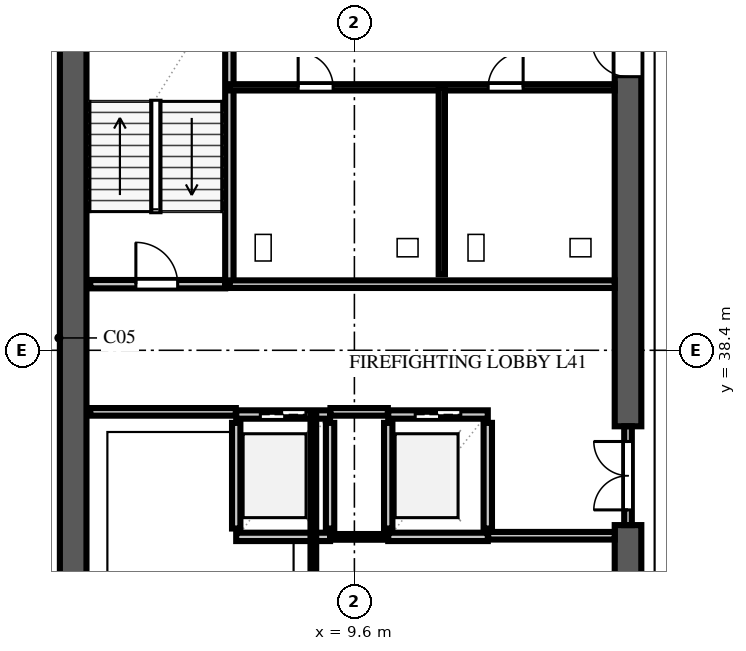
"""IFC4 building model, lengths in metres.
Left out: names, types, materials, properties, quantities, classifications, styles, units other than length and angle.
Written with IfcOpenShell. Run it as: python <this file> out.ifc"""

import sys

from ifc_helpers import new_model, si_unit, direction, frame, frame_2d, origin, place, context, subcontext, project, spatial, rectangle, extrude, element, fill, save


model = new_model("IFC4")
c1 = context("Model", 3, precision=1e-05, world=origin(), true_north=direction((0.0, 1.0)))
c2 = subcontext(c1, "Body", "Model", "MODEL_VIEW")
j1 = project(units=[si_unit("LENGTHUNIT", "METRE"), si_unit("PLANEANGLEUNIT", "RADIAN")], contexts=[c1])
p1 = place(None, origin())
s1 = spatial("IfcSite", under=j1, at=p1, CompositionType="ELEMENT")
p2 = place(p1, origin())
s2 = spatial("IfcBuilding", under=s1, at=p2, CompositionType="ELEMENT")
p3 = place(p2, frame((0.0, 0.0, 163.6)))
s3 = spatial("IfcBuildingStorey", under=s2, at=p3, CompositionType="ELEMENT", Elevation=163.6)
p4 = place(p3, frame((2.2, 9.25, 0.0), z_axis=(0.0, 0.0, 1.0), x_axis=(0.0, 1.0, 0.0)))
e1 = element("IfcWall", 1, at=p4, inside=s3, PredefinedType="SHEAR", context=c2, shape_type="SweptSolid", body=[
    extrude(rectangle(XDim=39.1, YDim=0.7, at=frame_2d((19.55, 0.0))), origin(), (0.0, 0.0, 1.0), 3.54),
])
p5 = place(p3, frame((16.8, 26.0, 0.0), z_axis=(0.0, 0.0, 1.0), x_axis=(0.0, 1.0, 0.0)))
e2 = element("IfcWall", 2, at=p5, inside=s3, PredefinedType="SHEAR", context=c2, shape_type="SweptSolid", body=[
    extrude(rectangle(XDim=7.8, YDim=0.7, at=frame_2d((3.9, 0.0))), origin(), (0.0, 0.0, 1.0), 3.54),
])
p6 = place(p3, frame((16.8, 36.4, 0.0), z_axis=(0.0, 0.0, 1.0), x_axis=(0.0, 1.0, 0.0)))
e3 = element("IfcWall", 3, at=p6, inside=s3, PredefinedType="SHEAR", context=c2, shape_type="SweptSolid", body=[
    extrude(rectangle(XDim=11.25, YDim=0.7, at=frame_2d((5.625, 0.0))), origin(), (0.0, 0.0, 1.0), 3.54),
])
p7 = place(p6, frame((9.2, 0.0, 0.0)))
e4 = element("IfcOpeningElement", 4, at=p7, cuts=e3, PredefinedType="OPENING", context=c2, shape_type="SweptSolid", body=[
    extrude(rectangle(XDim=0.95, YDim=2.15, at=frame_2d((0.475, 1.075))), frame((0.0, 0.362, 0.0), z_axis=(0.0, -1.0, 0.0), x_axis=(1.0, 0.0, 0.0)), (0.0, 0.0, 1.0), 0.724),
])
p8 = place(p3, frame((2.65, 40.14, 0.0), z_axis=(0.0, 0.0, 1.0), x_axis=(1.0, 0.0, 0.0)))
e5 = element("IfcWall", 5, at=p8, inside=s3, PredefinedType="SOLIDWALL", context=c2, shape_type="SweptSolid", body=[
    extrude(rectangle(XDim=3.55, YDim=0.22, at=frame_2d((1.775, 0.0))), origin(), (0.0, 0.0, 1.0), 3.54),
])
p9 = place(p8, frame((1.2, 0.0, 0.0)))
e6 = element("IfcOpeningElement", 6, at=p9, cuts=e5, PredefinedType="OPENING", context=c2, shape_type="SweptSolid", body=[
    extrude(rectangle(XDim=1.1, YDim=2.2, at=frame_2d((0.55, 1.1))), frame((0.0, 0.122, 0.0), z_axis=(0.0, -1.0, 0.0), x_axis=(1.0, 0.0, 0.0)), (0.0, 0.0, 1.0), 0.244),
])
p10 = place(p3, frame((6.31, 40.14, 0.0), z_axis=(0.0, 0.0, 1.0), x_axis=(0.0, 1.0, 0.0)))
e7 = element("IfcWall", 7, at=p10, inside=s3, PredefinedType="SOLIDWALL", context=c2, shape_type="SweptSolid", body=[
    extrude(rectangle(XDim=7.81, YDim=0.22, at=frame_2d((3.905, 0.0))), origin(), (0.0, 0.0, 1.0), 3.54),
])
for number, where, z_axis, x_axis in (
    (8, (6.49, 33.71, 0.0), (0.0, 0.0, 1.0), (0.0, 1.0, 0.0)),
    (9, (8.96, 33.71, 0.0), (0.0, 0.0, 1.0), (0.0, 1.0, 0.0)),
):
    element("IfcWall", number, at=place(p3, frame(where, z_axis=z_axis, x_axis=x_axis)), inside=s3, PredefinedType="SOLIDWALL", context=c2, shape_type="SweptSolid", body=[
        extrude(rectangle(XDim=2.78, YDim=0.22, at=frame_2d((1.39, 0.0))), origin(), (0.0, 0.0, 1.0), 3.54),
    ])
p11 = place(p3, frame((6.49, 33.49, 0.0), z_axis=(0.0, 0.0, 1.0), x_axis=(1.0, 0.0, 0.0)))
e10 = element("IfcWall", 10, at=p11, inside=s3, PredefinedType="SOLIDWALL", context=c2, shape_type="SweptSolid", body=[
    extrude(rectangle(XDim=2.47, YDim=0.22, at=frame_2d((1.235, 0.0))), origin(), (0.0, 0.0, 1.0), 3.54),
])
p12 = place(p3, frame((6.49, 36.71, 0.0), z_axis=(0.0, 0.0, 1.0), x_axis=(1.0, 0.0, 0.0)))
e11 = element("IfcWall", 11, at=p12, inside=s3, PredefinedType="SOLIDWALL", context=c2, shape_type="SweptSolid", body=[
    extrude(rectangle(XDim=2.47, YDim=0.22, at=frame_2d((1.235, 0.0))), origin(), (0.0, 0.0, 1.0), 3.54),
])
p13 = place(p12, frame((0.635, 0.0, 0.0)))
e12 = element("IfcOpeningElement", 12, at=p13, cuts=e11, PredefinedType="OPENING", context=c2, shape_type="SweptSolid", body=[
    extrude(rectangle(XDim=1.2, YDim=2.2, at=frame_2d((0.6, 1.1))), frame((0.0, 0.122, 0.0), z_axis=(0.0, -1.0, 0.0), x_axis=(1.0, 0.0, 0.0)), (0.0, 0.0, 1.0), 0.244),
])
for number, where, z_axis, x_axis in (
    (13, (10.49, 33.71, 0.0), (0.0, 0.0, 1.0), (0.0, 1.0, 0.0)),
    (14, (13.11, 33.71, 0.0), (0.0, 0.0, 1.0), (0.0, 1.0, 0.0)),
):
    element("IfcWall", number, at=place(p3, frame(where, z_axis=z_axis, x_axis=x_axis)), inside=s3, PredefinedType="SOLIDWALL", context=c2, shape_type="SweptSolid", body=[
        extrude(rectangle(XDim=2.78, YDim=0.22, at=frame_2d((1.39, 0.0))), origin(), (0.0, 0.0, 1.0), 3.54),
    ])
p14 = place(p3, frame((10.49, 33.49, 0.0), z_axis=(0.0, 0.0, 1.0), x_axis=(1.0, 0.0, 0.0)))
e15 = element("IfcWall", 15, at=p14, inside=s3, PredefinedType="SOLIDWALL", context=c2, shape_type="SweptSolid", body=[
    extrude(rectangle(XDim=2.62, YDim=0.22, at=frame_2d((1.31, 0.0))), origin(), (0.0, 0.0, 1.0), 3.54),
])
p15 = place(p3, frame((10.49, 36.71, 0.0), z_axis=(0.0, 0.0, 1.0), x_axis=(1.0, 0.0, 0.0)))
e16 = element("IfcWall", 16, at=p15, inside=s3, PredefinedType="SOLIDWALL", context=c2, shape_type="SweptSolid", body=[
    extrude(rectangle(XDim=2.62, YDim=0.22, at=frame_2d((1.31, 0.0))), origin(), (0.0, 0.0, 1.0), 3.54),
])
p16 = place(p15, frame((0.71, 0.0, 0.0)))
e17 = element("IfcOpeningElement", 17, at=p16, cuts=e16, PredefinedType="OPENING", context=c2, shape_type="SweptSolid", body=[
    extrude(rectangle(XDim=1.2, YDim=2.2, at=frame_2d((0.6, 1.1))), frame((0.0, 0.122, 0.0), z_axis=(0.0, -1.0, 0.0), x_axis=(1.0, 0.0, 0.0)), (0.0, 0.0, 1.0), 0.244),
])
p17 = place(p3, frame((2.65, 36.78, 0.0), z_axis=(0.0, 0.0, 1.0), x_axis=(1.0, 0.0, 0.0)))
e18 = element("IfcWall", 18, at=p17, inside=s3, PredefinedType="SOLIDWALL", context=c2, shape_type="SweptSolid", body=[
    extrude(rectangle(XDim=3.83, YDim=0.2, at=frame_2d((1.915, 0.0))), origin(), (0.0, 0.0, 1.0), 3.54),
])
p18 = place(p3, frame((8.97, 36.78, 0.0), z_axis=(0.0, 0.0, 1.0), x_axis=(1.0, 0.0, 0.0)))
e19 = element("IfcWall", 19, at=p18, inside=s3, PredefinedType="SOLIDWALL", context=c2, shape_type="SweptSolid", body=[
    extrude(rectangle(XDim=1.51, YDim=0.2, at=frame_2d((0.755, 0.0))), origin(), (0.0, 0.0, 1.0), 3.54),
])
p19 = place(p3, frame((13.12, 33.52, 0.0), z_axis=(0.0, 0.0, 1.0), x_axis=(1.0, 0.0, 0.0)))
e20 = element("IfcWall", 20, at=p19, inside=s3, PredefinedType="SOLIDWALL", context=c2, shape_type="SweptSolid", body=[
    extrude(rectangle(XDim=3.33, YDim=0.2, at=frame_2d((1.665, 0.0))), origin(), (0.0, 0.0, 1.0), 3.54),
])
p20 = place(p3, frame((6.32, 40.14, 0.0), z_axis=(0.0, 0.0, 1.0), x_axis=(1.0, 0.0, 0.0)))
e21 = element("IfcWall", 21, at=p20, inside=s3, PredefinedType="SOLIDWALL", context=c2, shape_type="SweptSolid", body=[
    extrude(rectangle(XDim=10.13, YDim=0.2, at=frame_2d((5.065, 0.0))), origin(), (0.0, 0.0, 1.0), 3.54),
])
p21 = place(p3, frame((16.8, 33.8, 0.0), z_axis=(0.0, 0.0, 1.0), x_axis=(0.0, 1.0, 0.0)))
e22 = element("IfcWall", 22, at=p21, inside=s3, PredefinedType="SOLIDWALL", context=c2, shape_type="SweptSolid", body=[
    extrude(rectangle(XDim=2.6, YDim=0.2, at=frame_2d((1.3, 0.0))), origin(), (0.0, 0.0, 1.0), 3.54),
])
p22 = place(p21, frame((0.4, 0.0, 0.0)))
e23 = element("IfcOpeningElement", 23, at=p22, cuts=e22, PredefinedType="OPENING", context=c2, shape_type="SweptSolid", body=[
    extrude(rectangle(XDim=1.8, YDim=2.2, at=frame_2d((0.9, 1.1))), frame((0.0, 0.112, 0.0), z_axis=(0.0, -1.0, 0.0), x_axis=(1.0, 0.0, 0.0)), (0.0, 0.0, 1.0), 0.224),
])
p23 = place(p3, frame((8.965, 33.49, 0.0), z_axis=(0.0, 0.0, 1.0), x_axis=(1.0, 0.0, 0.0)))
e24 = element("IfcWall", 24, at=p23, inside=s3, PredefinedType="PARTITIONING", context=c2, shape_type="SweptSolid", body=[
    extrude(rectangle(XDim=1.52, YDim=0.15, at=frame_2d((0.76, 0.0))), origin(), (0.0, 0.0, 1.0), 3.54),
])
p24 = place(p3, frame((8.52, 12.02, 0.0), z_axis=(0.0, 0.0, 1.0), x_axis=(0.0, 1.0, 0.0)))
e25 = element("IfcWall", 25, at=p24, inside=s3, PredefinedType="PARTITIONING", context=c2, shape_type="SweptSolid", body=[
    extrude(rectangle(XDim=24.76, YDim=0.15, at=frame_2d((12.38, 0.0))), origin(), (0.0, 0.0, 1.0), 3.54),
])
p25 = place(p24, frame((2.0, 0.0, 0.0)))
e26 = element("IfcOpeningElement", 26, at=p25, cuts=e25, PredefinedType="OPENING", context=c2, shape_type="SweptSolid", body=[
    extrude(rectangle(XDim=0.85, YDim=2.1, at=frame_2d((0.425, 1.05))), frame((0.0, 0.087, 0.0), z_axis=(0.0, -1.0, 0.0), x_axis=(1.0, 0.0, 0.0)), (0.0, 0.0, 1.0), 0.174),
])
p26 = place(p24, frame((12.0, 0.0, 0.0)))
e27 = element("IfcOpeningElement", 27, at=p26, cuts=e25, PredefinedType="OPENING", context=c2, shape_type="SweptSolid", body=[
    extrude(rectangle(XDim=1.0, YDim=2.2, at=frame_2d((0.5, 1.1))), frame((0.0, 0.087, 0.0), z_axis=(0.0, -1.0, 0.0), x_axis=(1.0, 0.0, 0.0)), (0.0, 0.0, 1.0), 0.174),
])
p27 = place(p3, frame((6.32, 45.32, 0.0), z_axis=(0.0, 0.0, 1.0), x_axis=(1.0, 0.0, 0.0)))
e28 = element("IfcWall", 28, at=p27, inside=s3, PredefinedType="PLUMBINGWALL", context=c2, shape_type="SweptSolid", body=[
    extrude(rectangle(XDim=10.13, YDim=0.165, at=frame_2d((5.065, 0.0))), origin(), (0.0, 0.0, 1.0), 3.54),
])
p28 = place(p27, frame((1.8, 0.0, 0.0)))
e29 = element("IfcOpeningElement", 29, at=p28, cuts=e28, PredefinedType="OPENING", context=c2, shape_type="SweptSolid", body=[
    extrude(rectangle(XDim=0.92, YDim=2.15, at=frame_2d((0.46, 1.075))), frame((0.0, 0.094, 0.0), z_axis=(0.0, -1.0, 0.0), x_axis=(1.0, 0.0, 0.0)), (0.0, 0.0, 1.0), 0.189),
])
p29 = place(p27, frame((6.8, 0.0, 0.0)))
e30 = element("IfcOpeningElement", 30, at=p29, cuts=e28, PredefinedType="OPENING", context=c2, shape_type="SweptSolid", body=[
    extrude(rectangle(XDim=0.92, YDim=2.15, at=frame_2d((0.46, 1.075))), frame((0.0, 0.094, 0.0), z_axis=(0.0, -1.0, 0.0), x_axis=(1.0, 0.0, 0.0)), (0.0, 0.0, 1.0), 0.189),
])
p30 = place(p3, frame((11.9, 40.4, 0.0), z_axis=(0.0, 0.0, 1.0), x_axis=(0.0, 1.0, 0.0)))
e31 = element("IfcWall", 31, at=p30, inside=s3, PredefinedType="PLUMBINGWALL", context=c2, shape_type="SweptSolid", body=[
    extrude(rectangle(XDim=4.92, YDim=0.165, at=frame_2d((2.46, 0.0))), origin(), (0.0, 0.0, 1.0), 3.54),
])
p31 = place(p9, origin())
e32 = element("IfcDoor", 32, at=p31, inside=s3, OperationType="SINGLE_SWING_LEFT", PredefinedType="DOOR", context=c2, shape_type="SweptSolid", body=[
    extrude(rectangle(XDim=1.1, YDim=2.2, at=frame_2d((0.55, 1.1))), frame((0.0, 0.025, 0.0), z_axis=(0.0, -1.0, 0.0), x_axis=(1.0, 0.0, 0.0)), (0.0, 0.0, 1.0), 0.05),
])
fill(e6, e32)
p32 = place(p13, origin())
e33 = element("IfcDoor", 33, at=p32, inside=s3, OperationType="DOUBLE_DOOR_SLIDING", PredefinedType="DOOR", context=c2, shape_type="SweptSolid", body=[
    extrude(rectangle(XDim=1.2, YDim=2.2, at=frame_2d((0.6, 1.1))), frame((0.0, 0.025, 0.0), z_axis=(0.0, -1.0, 0.0), x_axis=(1.0, 0.0, 0.0)), (0.0, 0.0, 1.0), 0.05),
])
fill(e12, e33)
p33 = place(p16, origin())
e34 = element("IfcDoor", 34, at=p33, inside=s3, OperationType="DOUBLE_DOOR_SLIDING", PredefinedType="DOOR", context=c2, shape_type="SweptSolid", body=[
    extrude(rectangle(XDim=1.2, YDim=2.2, at=frame_2d((0.6, 1.1))), frame((0.0, 0.025, 0.0), z_axis=(0.0, -1.0, 0.0), x_axis=(1.0, 0.0, 0.0)), (0.0, 0.0, 1.0), 0.05),
])
fill(e17, e34)
p34 = place(p7, origin())
e35 = element("IfcDoor", 35, at=p34, inside=s3, OperationType="SINGLE_SWING_RIGHT", PredefinedType="DOOR", context=c2, shape_type="SweptSolid", body=[
    extrude(rectangle(XDim=0.95, YDim=2.15, at=frame_2d((0.475, 1.075))), frame((0.0, 0.025, 0.0), z_axis=(0.0, -1.0, 0.0), x_axis=(1.0, 0.0, 0.0)), (0.0, 0.0, 1.0), 0.05),
])
fill(e4, e35)
p35 = place(p22, origin())
e36 = element("IfcDoor", 36, at=p35, inside=s3, OperationType="DOUBLE_DOOR_SINGLE_SWING", PredefinedType="DOOR", context=c2, shape_type="SweptSolid", body=[
    extrude(rectangle(XDim=1.8, YDim=2.2, at=frame_2d((0.9, 1.1))), frame((0.0, 0.025, 0.0), z_axis=(0.0, -1.0, 0.0), x_axis=(1.0, 0.0, 0.0)), (0.0, 0.0, 1.0), 0.05),
])
fill(e23, e36)
p36 = place(p28, origin())
e37 = element("IfcDoor", 37, at=p36, inside=s3, OperationType="SINGLE_SWING_LEFT", PredefinedType="DOOR", context=c2, shape_type="SweptSolid", body=[
    extrude(rectangle(XDim=0.92, YDim=2.15, at=frame_2d((0.46, 1.075))), frame((0.0, 0.025, 0.0), z_axis=(0.0, -1.0, 0.0), x_axis=(1.0, 0.0, 0.0)), (0.0, 0.0, 1.0), 0.05),
])
fill(e29, e37)
p37 = place(p29, origin())
e38 = element("IfcDoor", 38, at=p37, inside=s3, OperationType="SINGLE_SWING_RIGHT", PredefinedType="DOOR", context=c2, shape_type="SweptSolid", body=[
    extrude(rectangle(XDim=0.92, YDim=2.15, at=frame_2d((0.46, 1.075))), frame((0.0, 0.025, 0.0), z_axis=(0.0, -1.0, 0.0), x_axis=(1.0, 0.0, 0.0)), (0.0, 0.0, 1.0), 0.05),
])
fill(e30, e38)
save(model, sys.argv[1])
